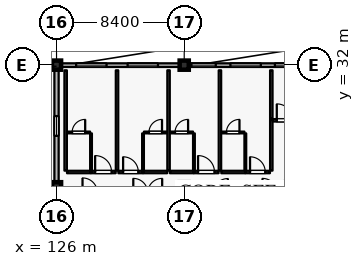
"""IFC4 building model, lengths in metres.
Left out: names, types, materials, properties, quantities, classifications, styles, units other than length and angle.
Written with IfcOpenShell. Run it as: python <this file> out.ifc"""

import sys

from ifc_helpers import new_model, si_unit, direction, frame, frame_2d, origin, origin_2d, place, context, subcontext, project, spatial, rectangle, extrude, element, fill, save


model = new_model("IFC4")
c1 = context("Model", 3, precision=1e-05, world=origin(), true_north=direction((0.0, 1.0)))
c2 = subcontext(c1, "Body", "Model", "MODEL_VIEW")
j1 = project(units=[si_unit("LENGTHUNIT", "METRE"), si_unit("PLANEANGLEUNIT", "RADIAN")], contexts=[c1])
p1 = place(None, origin())
s1 = spatial("IfcSite", under=j1, at=p1, CompositionType="ELEMENT")
p2 = place(p1, origin())
s2 = spatial("IfcBuilding", under=s1, at=p2, CompositionType="ELEMENT")
p3 = place(p2, frame((0.0, 0.0, 43.2)))
s3 = spatial("IfcBuildingStorey", under=s2, at=p3, CompositionType="ELEMENT", Elevation=43.2)
for number, where, z_axis, x_axis in (
    (1, (126.0, 32.0, 0.0), (0.0, 0.0, 1.0), (1.0, 0.0, 0.0)),
    (2, (134.4, 32.0, 0.0), (0.0, 0.0, 1.0), (1.0, 0.0, 0.0)),
    (3, (126.0, 24.0, 0.0), (0.0, 0.0, 1.0), (1.0, 0.0, 0.0)),
    (4, (134.4, 24.0, 0.0), (0.0, 0.0, 1.0), (1.0, 0.0, 0.0)),
):
    element("IfcColumn", number, at=place(p3, frame(where, z_axis=z_axis, x_axis=x_axis)), inside=s3, PredefinedType="COLUMN", context=c2, shape_type="SweptSolid", body=[
        extrude(rectangle(XDim=0.6, YDim=0.6, at=origin_2d()), origin(), (0.0, 0.0, 1.0), 4.2),
    ])
p4 = place(p3, frame((126.3, 32.0, 0.0), z_axis=(0.0, 0.0, 1.0), x_axis=(1.0, 0.0, 0.0)))
e5 = element("IfcWall", 5, at=p4, inside=s3, PredefinedType="SOLIDWALL", context=c2, shape_type="SweptSolid", body=[
    extrude(rectangle(XDim=7.8, YDim=0.24, at=frame_2d((3.9, 0.0))), origin(), (0.0, 0.0, 1.0), 3.54),
])
p5 = place(p4, frame((0.99, 0.0, 0.8)))
e6 = element("IfcOpeningElement", 6, at=p5, cuts=e5, PredefinedType="OPENING", context=c2, shape_type="SweptSolid", body=[
    extrude(rectangle(XDim=2.0, YDim=1.75, at=frame_2d((1.0, 0.875))), frame((0.0, 0.13, 0.0), z_axis=(0.0, -1.0, 0.0), x_axis=(1.0, 0.0, 0.0)), (0.0, 0.0, 1.0), 0.26),
])
p6 = place(p4, frame((4.375, 0.0, 0.8)))
e7 = element("IfcOpeningElement", 7, at=p6, cuts=e5, PredefinedType="OPENING", context=c2, shape_type="SweptSolid", body=[
    extrude(rectangle(XDim=2.0, YDim=1.75, at=frame_2d((1.0, 0.875))), frame((0.0, 0.13, 0.0), z_axis=(0.0, -1.0, 0.0), x_axis=(1.0, 0.0, 0.0)), (0.0, 0.0, 1.0), 0.26),
])
p7 = place(p3, frame((134.7, 32.0, 0.0), z_axis=(0.0, 0.0, 1.0), x_axis=(1.0, 0.0, 0.0)))
e8 = element("IfcWall", 8, at=p7, inside=s3, PredefinedType="SOLIDWALL", context=c2, shape_type="SweptSolid", body=[
    extrude(rectangle(XDim=7.8, YDim=0.24, at=frame_2d((3.9, 0.0))), origin(), (0.0, 0.0, 1.0), 3.54),
])
p8 = place(p7, frame((0.175, 0.0, 0.8)))
e9 = element("IfcOpeningElement", 9, at=p8, cuts=e8, PredefinedType="OPENING", context=c2, shape_type="SweptSolid", body=[
    extrude(rectangle(XDim=1.6, YDim=1.6, at=frame_2d((0.8, 0.8))), frame((0.0, 0.13, 0.0), z_axis=(0.0, -1.0, 0.0), x_axis=(1.0, 0.0, 0.0)), (0.0, 0.0, 1.0), 0.26),
])
p9 = place(p7, frame((2.74, 0.0, 0.8)))
e10 = element("IfcOpeningElement", 10, at=p9, cuts=e8, PredefinedType="OPENING", context=c2, shape_type="SweptSolid", body=[
    extrude(rectangle(XDim=2.0, YDim=1.75, at=frame_2d((1.0, 0.875))), frame((0.0, 0.13, 0.0), z_axis=(0.0, -1.0, 0.0), x_axis=(1.0, 0.0, 0.0)), (0.0, 0.0, 1.0), 0.26),
])
p10 = place(p7, frame((5.665, 0.0, 0.8)))
e11 = element("IfcOpeningElement", 11, at=p10, cuts=e8, PredefinedType="OPENING", context=c2, shape_type="SweptSolid", body=[
    extrude(rectangle(XDim=2.0, YDim=1.75, at=frame_2d((1.0, 0.875))), frame((0.0, 0.13, 0.0), z_axis=(0.0, -1.0, 0.0), x_axis=(1.0, 0.0, 0.0)), (0.0, 0.0, 1.0), 0.26),
])
p11 = place(p3, frame((126.0, 24.3, 0.0), z_axis=(0.0, 0.0, 1.0), x_axis=(0.0, 1.0, 0.0)))
e12 = element("IfcWall", 12, at=p11, inside=s3, PredefinedType="SOLIDWALL", context=c2, shape_type="SweptSolid", body=[
    extrude(rectangle(XDim=7.4, YDim=0.28, at=frame_2d((3.7, 0.0))), origin(), (0.0, 0.0, 1.0), 3.3),
])
p12 = place(p11, frame((3.05, 0.0, 0.75)))
e13 = element("IfcOpeningElement", 13, at=p12, cuts=e12, PredefinedType="OPENING", context=c2, shape_type="SweptSolid", body=[
    extrude(rectangle(XDim=1.3, YDim=1.65, at=frame_2d((0.65, 0.825))), frame((0.0, 0.15, 0.0), z_axis=(0.0, -1.0, 0.0), x_axis=(1.0, 0.0, 0.0)), (0.0, 0.0, 1.0), 0.3),
])
p13 = place(p3, frame((126.69, 24.97, 0.0), z_axis=(0.0, 0.0, 1.0), x_axis=(1.0, 0.0, 0.0)))
e14 = element("IfcWall", 14, at=p13, inside=s3, PredefinedType="PARTITIONING", context=c2, shape_type="SweptSolid", body=[
    extrude(rectangle(XDim=1.57, YDim=0.16, at=frame_2d((0.785, 0.0))), origin(), (0.0, 0.0, 1.0), 3.935),
])
p14 = place(p3, frame((128.27, 24.97, 0.0), z_axis=(0.0, 0.0, 1.0), x_axis=(1.0, 0.0, 0.0)))
e15 = element("IfcWall", 15, at=p14, inside=s3, PredefinedType="PARTITIONING", context=c2, shape_type="SweptSolid", body=[
    extrude(rectangle(XDim=1.62, YDim=0.16, at=frame_2d((0.81, 0.0))), origin(), (0.0, 0.0, 1.0), 3.935),
])
p15 = place(p14, frame((0.27, 0.0, 0.0)))
e16 = element("IfcOpeningElement", 16, at=p15, cuts=e15, PredefinedType="OPENING", context=c2, shape_type="SweptSolid", body=[
    extrude(rectangle(XDim=1.08, YDim=2.3, at=frame_2d((0.54, 1.15))), frame((0.0, 0.09, 0.0), z_axis=(0.0, -1.0, 0.0), x_axis=(1.0, 0.0, 0.0)), (0.0, 0.0, 1.0), 0.18),
])
p16 = place(p3, frame((128.27, 25.06, 0.0), z_axis=(0.0, 0.0, 1.0), x_axis=(0.0, 1.0, 0.0)))
e17 = element("IfcWall", 17, at=p16, inside=s3, PredefinedType="PARTITIONING", context=c2, shape_type="SweptSolid", body=[
    extrude(rectangle(XDim=2.45, YDim=0.115, at=frame_2d((1.225, 0.0))), origin(), (0.0, 0.0, 1.0), 3.935),
])
p17 = place(p3, frame((126.7, 27.57, 0.0), z_axis=(0.0, 0.0, 1.0), x_axis=(1.0, 0.0, 0.0)))
e18 = element("IfcWall", 18, at=p17, inside=s3, PredefinedType="PARTITIONING", context=c2, shape_type="SweptSolid", body=[
    extrude(rectangle(XDim=1.51, YDim=0.115, at=frame_2d((0.755, 0.0))), origin(), (0.0, 0.0, 1.0), 3.935),
])
p18 = place(p17, frame((0.325, 0.0, 0.0)))
e19 = element("IfcOpeningElement", 19, at=p18, cuts=e18, PredefinedType="OPENING", context=c2, shape_type="SweptSolid", body=[
    extrude(rectangle(XDim=0.86, YDim=2.12, at=frame_2d((0.43, 1.06))), frame((0.0, 0.067, 0.0), z_axis=(0.0, -1.0, 0.0), x_axis=(1.0, 0.0, 0.0)), (0.0, 0.0, 1.0), 0.135),
])
p19 = place(p3, frame((126.6, 25.06, 0.0), z_axis=(0.0, 0.0, 1.0), x_axis=(0.0, 1.0, 0.0)))
e20 = element("IfcWall", 20, at=p19, inside=s3, PredefinedType="PARTITIONING", context=c2, shape_type="SweptSolid", body=[
    extrude(rectangle(XDim=6.6, YDim=0.16, at=frame_2d((3.3, 0.0))), origin(), (0.0, 0.0, 1.0), 3.935),
])
p20 = place(p3, frame((130.07, 24.97, 0.0), z_axis=(0.0, 0.0, 1.0), x_axis=(1.0, 0.0, 0.0)))
e21 = element("IfcWall", 21, at=p20, inside=s3, PredefinedType="PARTITIONING", context=c2, shape_type="SweptSolid", body=[
    extrude(rectangle(XDim=1.62, YDim=0.16, at=frame_2d((0.81, 0.0))), origin(), (0.0, 0.0, 1.0), 3.935),
])
p21 = place(p20, frame((0.31, 0.0, 0.0)))
e22 = element("IfcOpeningElement", 22, at=p21, cuts=e21, PredefinedType="OPENING", context=c2, shape_type="SweptSolid", body=[
    extrude(rectangle(XDim=1.0, YDim=2.25, at=frame_2d((0.5, 1.125))), frame((0.0, 0.09, 0.0), z_axis=(0.0, -1.0, 0.0), x_axis=(1.0, 0.0, 0.0)), (0.0, 0.0, 1.0), 0.18),
])
p22 = place(p3, frame((131.7, 24.97, 0.0), z_axis=(0.0, 0.0, 1.0), x_axis=(1.0, 0.0, 0.0)))
e23 = element("IfcWall", 23, at=p22, inside=s3, PredefinedType="PARTITIONING", context=c2, shape_type="SweptSolid", body=[
    extrude(rectangle(XDim=1.58, YDim=0.16, at=frame_2d((0.79, 0.0))), origin(), (0.0, 0.0, 1.0), 3.935),
])
p23 = place(p3, frame((131.69, 25.06, 0.0), z_axis=(0.0, 0.0, 1.0), x_axis=(0.0, 1.0, 0.0)))
e24 = element("IfcWall", 24, at=p23, inside=s3, PredefinedType="PARTITIONING", context=c2, shape_type="SweptSolid", body=[
    extrude(rectangle(XDim=2.45, YDim=0.115, at=frame_2d((1.225, 0.0))), origin(), (0.0, 0.0, 1.0), 3.935),
])
p24 = place(p3, frame((131.75, 27.57, 0.0), z_axis=(0.0, 0.0, 1.0), x_axis=(1.0, 0.0, 0.0)))
e25 = element("IfcWall", 25, at=p24, inside=s3, PredefinedType="PARTITIONING", context=c2, shape_type="SweptSolid", body=[
    extrude(rectangle(XDim=1.52, YDim=0.115, at=frame_2d((0.76, 0.0))), origin(), (0.0, 0.0, 1.0), 3.935),
])
p25 = place(p24, frame((0.33, 0.0, 0.0)))
e26 = element("IfcOpeningElement", 26, at=p25, cuts=e25, PredefinedType="OPENING", context=c2, shape_type="SweptSolid", body=[
    extrude(rectangle(XDim=0.86, YDim=2.12, at=frame_2d((0.43, 1.06))), frame((0.0, 0.067, 0.0), z_axis=(0.0, -1.0, 0.0), x_axis=(1.0, 0.0, 0.0)), (0.0, 0.0, 1.0), 0.135),
])
p26 = place(p3, frame((129.98, 25.06, 0.0), z_axis=(0.0, 0.0, 1.0), x_axis=(0.0, 1.0, 0.0)))
e27 = element("IfcWall", 27, at=p26, inside=s3, PredefinedType="PARTITIONING", context=c2, shape_type="SweptSolid", body=[
    extrude(rectangle(XDim=6.6, YDim=0.16, at=frame_2d((3.3, 0.0))), origin(), (0.0, 0.0, 1.0), 3.935),
])
p27 = place(p3, frame((133.46, 24.97, 0.0), z_axis=(0.0, 0.0, 1.0), x_axis=(1.0, 0.0, 0.0)))
e28 = element("IfcWall", 28, at=p27, inside=s3, PredefinedType="PARTITIONING", context=c2, shape_type="SweptSolid", body=[
    extrude(rectangle(XDim=1.57, YDim=0.16, at=frame_2d((0.785, 0.0))), origin(), (0.0, 0.0, 1.0), 3.935),
])
p28 = place(p3, frame((135.04, 24.97, 0.0), z_axis=(0.0, 0.0, 1.0), x_axis=(1.0, 0.0, 0.0)))
e29 = element("IfcWall", 29, at=p28, inside=s3, PredefinedType="PARTITIONING", context=c2, shape_type="SweptSolid", body=[
    extrude(rectangle(XDim=1.62, YDim=0.16, at=frame_2d((0.81, 0.0))), origin(), (0.0, 0.0, 1.0), 3.935),
])
p29 = place(p28, frame((0.27, 0.0, 0.0)))
e30 = element("IfcOpeningElement", 30, at=p29, cuts=e29, PredefinedType="OPENING", context=c2, shape_type="SweptSolid", body=[
    extrude(rectangle(XDim=1.08, YDim=2.3, at=frame_2d((0.54, 1.15))), frame((0.0, 0.09, 0.0), z_axis=(0.0, -1.0, 0.0), x_axis=(1.0, 0.0, 0.0)), (0.0, 0.0, 1.0), 0.18),
])
p30 = place(p3, frame((135.04, 25.06, 0.0), z_axis=(0.0, 0.0, 1.0), x_axis=(0.0, 1.0, 0.0)))
e31 = element("IfcWall", 31, at=p30, inside=s3, PredefinedType="PARTITIONING", context=c2, shape_type="SweptSolid", body=[
    extrude(rectangle(XDim=2.45, YDim=0.115, at=frame_2d((1.225, 0.0))), origin(), (0.0, 0.0, 1.0), 3.935),
])
p31 = place(p3, frame((133.47, 27.57, 0.0), z_axis=(0.0, 0.0, 1.0), x_axis=(1.0, 0.0, 0.0)))
e32 = element("IfcWall", 32, at=p31, inside=s3, PredefinedType="PARTITIONING", context=c2, shape_type="SweptSolid", body=[
    extrude(rectangle(XDim=1.51, YDim=0.115, at=frame_2d((0.755, 0.0))), origin(), (0.0, 0.0, 1.0), 3.935),
])
p32 = place(p31, frame((0.325, 0.0, 0.0)))
e33 = element("IfcOpeningElement", 33, at=p32, cuts=e32, PredefinedType="OPENING", context=c2, shape_type="SweptSolid", body=[
    extrude(rectangle(XDim=0.86, YDim=2.12, at=frame_2d((0.43, 1.06))), frame((0.0, 0.067, 0.0), z_axis=(0.0, -1.0, 0.0), x_axis=(1.0, 0.0, 0.0)), (0.0, 0.0, 1.0), 0.135),
])
p33 = place(p3, frame((133.37, 25.06, 0.0), z_axis=(0.0, 0.0, 1.0), x_axis=(0.0, 1.0, 0.0)))
e34 = element("IfcWall", 34, at=p33, inside=s3, PredefinedType="PARTITIONING", context=c2, shape_type="SweptSolid", body=[
    extrude(rectangle(XDim=6.6, YDim=0.16, at=frame_2d((3.3, 0.0))), origin(), (0.0, 0.0, 1.0), 3.935),
])
p34 = place(p3, frame((136.84, 24.97, 0.0), z_axis=(0.0, 0.0, 1.0), x_axis=(1.0, 0.0, 0.0)))
e35 = element("IfcWall", 35, at=p34, inside=s3, PredefinedType="PARTITIONING", context=c2, shape_type="SweptSolid", body=[
    extrude(rectangle(XDim=1.57, YDim=0.16, at=frame_2d((0.785, 0.0))), origin(), (0.0, 0.0, 1.0), 3.935),
])
p35 = place(p3, frame((138.42, 24.97, 0.0), z_axis=(0.0, 0.0, 1.0), x_axis=(1.0, 0.0, 0.0)))
e36 = element("IfcWall", 36, at=p35, inside=s3, PredefinedType="PARTITIONING", context=c2, shape_type="SweptSolid", body=[
    extrude(rectangle(XDim=1.62, YDim=0.16, at=frame_2d((0.81, 0.0))), origin(), (0.0, 0.0, 1.0), 3.935),
])
p36 = place(p35, frame((0.31, 0.0, 0.0)))
e37 = element("IfcOpeningElement", 37, at=p36, cuts=e36, PredefinedType="OPENING", context=c2, shape_type="SweptSolid", body=[
    extrude(rectangle(XDim=1.0, YDim=2.25, at=frame_2d((0.5, 1.125))), frame((0.0, 0.09, 0.0), z_axis=(0.0, -1.0, 0.0), x_axis=(1.0, 0.0, 0.0)), (0.0, 0.0, 1.0), 0.18),
])
p37 = place(p3, frame((138.42, 25.06, 0.0), z_axis=(0.0, 0.0, 1.0), x_axis=(0.0, 1.0, 0.0)))
e38 = element("IfcWall", 38, at=p37, inside=s3, PredefinedType="PARTITIONING", context=c2, shape_type="SweptSolid", body=[
    extrude(rectangle(XDim=2.45, YDim=0.115, at=frame_2d((1.225, 0.0))), origin(), (0.0, 0.0, 1.0), 3.935),
])
p38 = place(p3, frame((136.85, 27.57, 0.0), z_axis=(0.0, 0.0, 1.0), x_axis=(1.0, 0.0, 0.0)))
e39 = element("IfcWall", 39, at=p38, inside=s3, PredefinedType="PARTITIONING", context=c2, shape_type="SweptSolid", body=[
    extrude(rectangle(XDim=1.51, YDim=0.115, at=frame_2d((0.755, 0.0))), origin(), (0.0, 0.0, 1.0), 3.935),
])
p39 = place(p38, frame((0.325, 0.0, 0.0)))
e40 = element("IfcOpeningElement", 40, at=p39, cuts=e39, PredefinedType="OPENING", context=c2, shape_type="SweptSolid", body=[
    extrude(rectangle(XDim=0.86, YDim=2.12, at=frame_2d((0.43, 1.06))), frame((0.0, 0.067, 0.0), z_axis=(0.0, -1.0, 0.0), x_axis=(1.0, 0.0, 0.0)), (0.0, 0.0, 1.0), 0.135),
])
p40 = place(p3, frame((136.75, 25.06, 0.0), z_axis=(0.0, 0.0, 1.0), x_axis=(0.0, 1.0, 0.0)))
e41 = element("IfcWall", 41, at=p40, inside=s3, PredefinedType="PARTITIONING", context=c2, shape_type="SweptSolid", body=[
    extrude(rectangle(XDim=6.6, YDim=0.16, at=frame_2d((3.3, 0.0))), origin(), (0.0, 0.0, 1.0), 3.935),
])
p41 = place(p3, frame((140.13, 25.06, 0.0), z_axis=(0.0, 0.0, 1.0), x_axis=(0.0, 1.0, 0.0)))
e42 = element("IfcWall", 42, at=p41, inside=s3, PredefinedType="PARTITIONING", context=c2, shape_type="SweptSolid", body=[
    extrude(rectangle(XDim=3.39, YDim=0.16, at=frame_2d((1.695, 0.0))), origin(), (0.0, 0.0, 1.0), 3.935),
])
p42 = place(p3, frame((140.22, 28.37, 0.0), z_axis=(0.0, 0.0, 1.0), x_axis=(1.0, 0.0, 0.0)))
e43 = element("IfcWall", 43, at=p42, inside=s3, PredefinedType="PARTITIONING", context=c2, shape_type="SweptSolid", body=[
    extrude(rectangle(XDim=1.62, YDim=0.16, at=frame_2d((0.81, 0.0))), origin(), (0.0, 0.0, 1.0), 3.935),
])
p43 = place(p42, frame((0.27, 0.0, 0.0)))
e44 = element("IfcOpeningElement", 44, at=p43, cuts=e43, PredefinedType="OPENING", context=c2, shape_type="SweptSolid", body=[
    extrude(rectangle(XDim=1.08, YDim=2.3, at=frame_2d((0.54, 1.15))), frame((0.0, 0.09, 0.0), z_axis=(0.0, -1.0, 0.0), x_axis=(1.0, 0.0, 0.0)), (0.0, 0.0, 1.0), 0.18),
])
p44 = place(p3, frame((140.13, 28.46, 0.0), z_axis=(0.0, 0.0, 1.0), x_axis=(0.0, 1.0, 0.0)))
e45 = element("IfcWall", 45, at=p44, inside=s3, PredefinedType="PARTITIONING", context=c2, shape_type="SweptSolid", body=[
    extrude(rectangle(XDim=3.2, YDim=0.16, at=frame_2d((1.6, 0.0))), origin(), (0.0, 0.0, 1.0), 3.935),
])
p45 = place(p5, origin())
e46 = element("IfcWindow", 46, at=p45, inside=s3, PartitioningType="DOUBLE_PANEL_VERTICAL", PredefinedType="WINDOW", context=c2, shape_type="SweptSolid", body=[
    extrude(rectangle(XDim=2.0, YDim=1.75, at=frame_2d((1.0, 0.875))), frame((0.0, 0.03, 0.0), z_axis=(0.0, -1.0, 0.0), x_axis=(1.0, 0.0, 0.0)), (0.0, 0.0, 1.0), 0.06),
])
fill(e6, e46)
p46 = place(p6, origin())
e47 = element("IfcWindow", 47, at=p46, inside=s3, PartitioningType="DOUBLE_PANEL_VERTICAL", PredefinedType="WINDOW", context=c2, shape_type="SweptSolid", body=[
    extrude(rectangle(XDim=2.0, YDim=1.75, at=frame_2d((1.0, 0.875))), frame((0.0, 0.03, 0.0), z_axis=(0.0, -1.0, 0.0), x_axis=(1.0, 0.0, 0.0)), (0.0, 0.0, 1.0), 0.06),
])
fill(e7, e47)
p47 = place(p8, origin())
e48 = element("IfcWindow", 48, at=p47, inside=s3, PartitioningType="SINGLE_PANEL", PredefinedType="WINDOW", context=c2, shape_type="SweptSolid", body=[
    extrude(rectangle(XDim=1.6, YDim=1.6, at=frame_2d((0.8, 0.8))), frame((0.0, 0.03, 0.0), z_axis=(0.0, -1.0, 0.0), x_axis=(1.0, 0.0, 0.0)), (0.0, 0.0, 1.0), 0.06),
])
fill(e9, e48)
p48 = place(p9, origin())
e49 = element("IfcWindow", 49, at=p48, inside=s3, PartitioningType="DOUBLE_PANEL_VERTICAL", PredefinedType="WINDOW", context=c2, shape_type="SweptSolid", body=[
    extrude(rectangle(XDim=2.0, YDim=1.75, at=frame_2d((1.0, 0.875))), frame((0.0, 0.03, 0.0), z_axis=(0.0, -1.0, 0.0), x_axis=(1.0, 0.0, 0.0)), (0.0, 0.0, 1.0), 0.06),
])
fill(e10, e49)
p49 = place(p10, origin())
e50 = element("IfcWindow", 50, at=p49, inside=s3, PartitioningType="DOUBLE_PANEL_VERTICAL", PredefinedType="WINDOW", context=c2, shape_type="SweptSolid", body=[
    extrude(rectangle(XDim=2.0, YDim=1.75, at=frame_2d((1.0, 0.875))), frame((0.0, 0.03, 0.0), z_axis=(0.0, -1.0, 0.0), x_axis=(1.0, 0.0, 0.0)), (0.0, 0.0, 1.0), 0.06),
])
fill(e11, e50)
p50 = place(p12, origin())
e51 = element("IfcWindow", 51, at=p50, inside=s3, PartitioningType="SINGLE_PANEL", PredefinedType="WINDOW", context=c2, shape_type="SweptSolid", body=[
    extrude(rectangle(XDim=1.3, YDim=1.65, at=frame_2d((0.65, 0.825))), frame((0.0, 0.03, 0.0), z_axis=(0.0, -1.0, 0.0), x_axis=(1.0, 0.0, 0.0)), (0.0, 0.0, 1.0), 0.06),
])
fill(e13, e51)
p51 = place(p15, origin())
e52 = element("IfcDoor", 52, at=p51, inside=s3, OperationType="SINGLE_SWING_LEFT", PredefinedType="DOOR", context=c2, shape_type="SweptSolid", body=[
    extrude(rectangle(XDim=1.08, YDim=2.3, at=frame_2d((0.54, 1.15))), frame((0.0, 0.025, 0.0), z_axis=(0.0, -1.0, 0.0), x_axis=(1.0, 0.0, 0.0)), (0.0, 0.0, 1.0), 0.05),
])
fill(e16, e52)
p52 = place(p18, origin())
e53 = element("IfcDoor", 53, at=p52, inside=s3, OperationType="SINGLE_SWING_RIGHT", PredefinedType="DOOR", context=c2, shape_type="SweptSolid", body=[
    extrude(rectangle(XDim=0.86, YDim=2.12, at=frame_2d((0.43, 1.06))), frame((0.0, 0.025, 0.0), z_axis=(0.0, -1.0, 0.0), x_axis=(1.0, 0.0, 0.0)), (0.0, 0.0, 1.0), 0.05),
])
fill(e19, e53)
p53 = place(p21, origin())
e54 = element("IfcDoor", 54, at=p53, inside=s3, OperationType="SINGLE_SWING_LEFT", PredefinedType="DOOR", context=c2, shape_type="SweptSolid", body=[
    extrude(rectangle(XDim=1.0, YDim=2.25, at=frame_2d((0.5, 1.125))), frame((0.0, 0.025, 0.0), z_axis=(0.0, -1.0, 0.0), x_axis=(1.0, 0.0, 0.0)), (0.0, 0.0, 1.0), 0.05),
])
fill(e22, e54)
p54 = place(p25, origin())
e55 = element("IfcDoor", 55, at=p54, inside=s3, OperationType="SINGLE_SWING_RIGHT", PredefinedType="DOOR", context=c2, shape_type="SweptSolid", body=[
    extrude(rectangle(XDim=0.86, YDim=2.12, at=frame_2d((0.43, 1.06))), frame((0.0, 0.025, 0.0), z_axis=(0.0, -1.0, 0.0), x_axis=(1.0, 0.0, 0.0)), (0.0, 0.0, 1.0), 0.05),
])
fill(e26, e55)
p55 = place(p29, origin())
e56 = element("IfcDoor", 56, at=p55, inside=s3, OperationType="SINGLE_SWING_LEFT", PredefinedType="DOOR", context=c2, shape_type="SweptSolid", body=[
    extrude(rectangle(XDim=1.08, YDim=2.3, at=frame_2d((0.54, 1.15))), frame((0.0, 0.025, 0.0), z_axis=(0.0, -1.0, 0.0), x_axis=(1.0, 0.0, 0.0)), (0.0, 0.0, 1.0), 0.05),
])
fill(e30, e56)
p56 = place(p32, origin())
e57 = element("IfcDoor", 57, at=p56, inside=s3, OperationType="SINGLE_SWING_RIGHT", PredefinedType="DOOR", context=c2, shape_type="SweptSolid", body=[
    extrude(rectangle(XDim=0.86, YDim=2.12, at=frame_2d((0.43, 1.06))), frame((0.0, 0.025, 0.0), z_axis=(0.0, -1.0, 0.0), x_axis=(1.0, 0.0, 0.0)), (0.0, 0.0, 1.0), 0.05),
])
fill(e33, e57)
p57 = place(p36, origin())
e58 = element("IfcDoor", 58, at=p57, inside=s3, OperationType="SINGLE_SWING_LEFT", PredefinedType="DOOR", context=c2, shape_type="SweptSolid", body=[
    extrude(rectangle(XDim=1.0, YDim=2.25, at=frame_2d((0.5, 1.125))), frame((0.0, 0.025, 0.0), z_axis=(0.0, -1.0, 0.0), x_axis=(1.0, 0.0, 0.0)), (0.0, 0.0, 1.0), 0.05),
])
fill(e37, e58)
p58 = place(p39, origin())
e59 = element("IfcDoor", 59, at=p58, inside=s3, OperationType="SINGLE_SWING_RIGHT", PredefinedType="DOOR", context=c2, shape_type="SweptSolid", body=[
    extrude(rectangle(XDim=0.86, YDim=2.12, at=frame_2d((0.43, 1.06))), frame((0.0, 0.025, 0.0), z_axis=(0.0, -1.0, 0.0), x_axis=(1.0, 0.0, 0.0)), (0.0, 0.0, 1.0), 0.05),
])
fill(e40, e59)
p59 = place(p43, origin())
e60 = element("IfcDoor", 60, at=p59, inside=s3, OperationType="SINGLE_SWING_LEFT", PredefinedType="DOOR", context=c2, shape_type="SweptSolid", body=[
    extrude(rectangle(XDim=1.08, YDim=2.3, at=frame_2d((0.54, 1.15))), frame((0.0, 0.025, 0.0), z_axis=(0.0, -1.0, 0.0), x_axis=(1.0, 0.0, 0.0)), (0.0, 0.0, 1.0), 0.05),
])
fill(e44, e60)
save(model, sys.argv[1])
